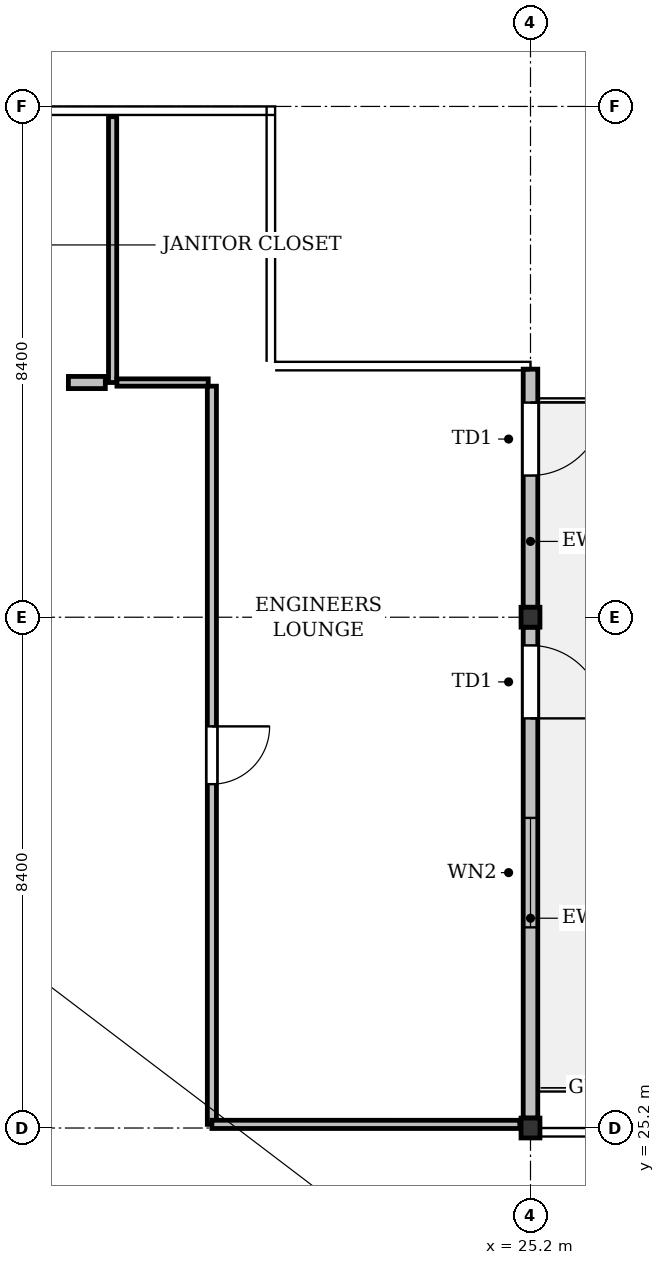
"""IFC4 building model, lengths in metres.
Left out: names, types, materials, properties, quantities, classifications, styles, units other than length and angle.
Written with IfcOpenShell. Run it as: python <this file> out.ifc"""

import sys

from ifc_helpers import new_model, si_unit, direction, frame, frame_2d, origin, origin_2d, place, context, subcontext, project, spatial, rectangle, i_section, extrude, element, fill, save


model = new_model("IFC4")
c1 = context("Model", 3, precision=1e-05, world=origin(), true_north=direction((0.0, 1.0)))
c2 = subcontext(c1, "Body", "Model", "MODEL_VIEW")
j1 = project(units=[si_unit("LENGTHUNIT", "METRE"), si_unit("PLANEANGLEUNIT", "RADIAN")], contexts=[c1])
p1 = place(None, origin())
s1 = spatial("IfcSite", under=j1, at=p1, CompositionType="ELEMENT")
p2 = place(p1, origin())
s2 = spatial("IfcBuilding", under=s1, at=p2, CompositionType="ELEMENT")
p3 = place(p2, frame((0.0, 0.0, 250.2)))
s3 = spatial("IfcBuildingStorey", under=s2, at=p3, CompositionType="ELEMENT", Elevation=250.2)
for number, where, z_axis, x_axis in (
    (1, (25.2, 25.2, 0.0), (0.0, 0.0, 1.0), (1.0, 0.0, 0.0)),
    (2, (25.2, 33.6, 0.0), (0.0, 0.0, 1.0), (1.0, 0.0, 0.0)),
):
    element("IfcColumn", number, at=place(p3, frame(where, z_axis=z_axis, x_axis=x_axis)), inside=s3, PredefinedType="COLUMN", context=c2, shape_type="SweptSolid", body=[
        extrude(i_section(OverallWidth=0.311, OverallDepth=0.327, WebThickness=0.016, FlangeThickness=0.025, FilletRadius=0.017, at=origin_2d()), origin(), (0.0, 0.0, 1.0), 4.0),
    ])
p4 = place(p3, frame((25.2, 37.68, 0.0), z_axis=(0.0, 0.0, 1.0), x_axis=(0.0, -1.0, 0.0)))
e3 = element("IfcWall", 3, at=p4, inside=s3, PredefinedType="STANDARD", context=c2, shape_type="SweptSolid", body=[
    extrude(rectangle(XDim=3.917, YDim=0.24, at=frame_2d((1.958, 0.0))), origin(), (0.0, 0.0, 1.0), 3.725),
])
p5 = place(p4, frame((0.55, 0.0, 0.0)))
e4 = element("IfcOpeningElement", 4, at=p5, cuts=e3, PredefinedType="OPENING", context=c2, shape_type="SweptSolid", body=[
    extrude(rectangle(XDim=1.2, YDim=2.2, at=frame_2d((0.6, 1.1))), frame((0.0, 0.13, 0.0), z_axis=(0.0, -1.0, 0.0), x_axis=(1.0, 0.0, 0.0)), (0.0, 0.0, 1.0), 0.26),
])
p6 = place(p3, frame((25.2, 33.437, 0.0), z_axis=(0.0, 0.0, 1.0), x_axis=(0.0, -1.0, 0.0)))
e5 = element("IfcWall", 5, at=p6, inside=s3, PredefinedType="STANDARD", context=c2, shape_type="SweptSolid", body=[
    extrude(rectangle(XDim=8.073, YDim=0.24, at=frame_2d((4.037, 0.0))), origin(), (0.0, 0.0, 1.0), 3.475),
])
p7 = place(p6, frame((0.3, 0.0, 0.0)))
e6 = element("IfcOpeningElement", 6, at=p7, cuts=e5, PredefinedType="OPENING", context=c2, shape_type="SweptSolid", body=[
    extrude(rectangle(XDim=1.2, YDim=2.2, at=frame_2d((0.6, 1.1))), frame((0.0, 0.13, 0.0), z_axis=(0.0, -1.0, 0.0), x_axis=(1.0, 0.0, 0.0)), (0.0, 0.0, 1.0), 0.26),
])
p8 = place(p6, frame((3.136, 0.0, 0.9)))
e7 = element("IfcOpeningElement", 7, at=p8, cuts=e5, PredefinedType="OPENING", context=c2, shape_type="SweptSolid", body=[
    extrude(rectangle(XDim=1.8, YDim=1.6, at=frame_2d((0.9, 0.8))), frame((0.0, 0.13, 0.0), z_axis=(0.0, -1.0, 0.0), x_axis=(1.0, 0.0, 0.0)), (0.0, 0.0, 1.0), 0.26),
])
p9 = place(p3, frame((18.327, 41.831, 0.0), z_axis=(0.0, 0.0, 1.0), x_axis=(0.0, -1.0, 0.0)))
e8 = element("IfcWall", 8, at=p9, inside=s3, PredefinedType="PARTITIONING", context=c2, shape_type="SweptSolid", body=[
    extrude(rectangle(XDim=4.371, YDim=0.135, at=frame_2d((2.186, 0.0))), origin(), (0.0, 0.0, 1.0), 3.725),
])
p10 = place(p3, frame((18.399, 37.46, 0.0), z_axis=(0.0, 0.0, 1.0), x_axis=(1.0, 0.0, 0.0)))
e9 = element("IfcWall", 9, at=p10, inside=s3, PredefinedType="PARTITIONING", context=c2, shape_type="SweptSolid", body=[
    extrude(rectangle(XDim=1.501, YDim=0.12, at=frame_2d((0.75, 0.0))), origin(), (0.0, 0.0, 1.0), 3.725),
])
p11 = place(p3, frame((19.96, 37.4, 0.0), z_axis=(0.0, 0.0, 1.0), x_axis=(0.0, -1.0, 0.0)))
e10 = element("IfcWall", 10, at=p11, inside=s3, PredefinedType="PARTITIONING", context=c2, shape_type="SweptSolid", body=[
    extrude(rectangle(XDim=12.14, YDim=0.15, at=frame_2d((6.07, 0.0))), origin(), (0.0, 0.0, 1.0), 3.271),
])
p12 = place(p11, frame((5.595, 0.0, 0.0)))
e11 = element("IfcOpeningElement", 11, at=p12, cuts=e10, PredefinedType="OPENING", context=c2, shape_type="SweptSolid", body=[
    extrude(rectangle(XDim=0.95, YDim=2.15, at=frame_2d((0.475, 1.075))), frame((0.0, 0.085, 0.0), z_axis=(0.0, -1.0, 0.0), x_axis=(1.0, 0.0, 0.0)), (0.0, 0.0, 1.0), 0.17),
])
p13 = place(p3, frame((19.96, 25.26, 0.0), z_axis=(0.0, 0.0, 1.0), x_axis=(0.999999995352, -9.641342e-05, 0.0)))
e12 = element("IfcWall", 12, at=p13, inside=s3, PredefinedType="PARTITIONING", context=c2, shape_type="SweptSolid", body=[
    extrude(rectangle(XDim=5.064, YDim=0.135, at=frame_2d((2.532, 0.0))), origin(), (0.0, 0.0, 1.0), 3.271),
])
p14 = place(p3, frame((17.6, 37.46, 0.0), z_axis=(0.0, 0.0, 1.0), x_axis=(1.0, 0.0, 0.0)))
e13 = element("IfcWall", 13, at=p14, inside=s3, PredefinedType="PARTITIONING", context=c2, shape_type="SweptSolid", body=[
    extrude(rectangle(XDim=0.607, YDim=0.2, at=frame_2d((0.304, 0.0))), origin(), (0.0, 0.0, 1.0), 3.725),
])
p15 = place(p5, origin())
e14 = element("IfcDoor", 14, at=p15, inside=s3, OperationType="SINGLE_SWING_LEFT", PredefinedType="DOOR", context=c2, shape_type="SweptSolid", body=[
    extrude(rectangle(XDim=1.2, YDim=2.2, at=frame_2d((0.6, 1.1))), frame((0.0, 0.025, 0.0), z_axis=(0.0, -1.0, 0.0), x_axis=(1.0, 0.0, 0.0)), (0.0, 0.0, 1.0), 0.05),
])
fill(e4, e14)
p16 = place(p7, origin())
e15 = element("IfcDoor", 15, at=p16, inside=s3, OperationType="SINGLE_SWING_RIGHT", PredefinedType="DOOR", context=c2, shape_type="SweptSolid", body=[
    extrude(rectangle(XDim=1.2, YDim=2.2, at=frame_2d((0.6, 1.1))), frame((0.0, 0.025, 0.0), z_axis=(0.0, -1.0, 0.0), x_axis=(1.0, 0.0, 0.0)), (0.0, 0.0, 1.0), 0.05),
])
fill(e6, e15)
p17 = place(p8, origin())
e16 = element("IfcWindow", 16, at=p17, inside=s3, PartitioningType="SINGLE_PANEL", PredefinedType="WINDOW", context=c2, shape_type="SweptSolid", body=[
    extrude(rectangle(XDim=1.8, YDim=1.6, at=frame_2d((0.9, 0.8))), frame((0.0, 0.03, 0.0), z_axis=(0.0, -1.0, 0.0), x_axis=(1.0, 0.0, 0.0)), (0.0, 0.0, 1.0), 0.06),
])
fill(e7, e16)
p18 = place(p12, origin())
e17 = element("IfcDoor", 17, at=p18, inside=s3, OperationType="SINGLE_SWING_LEFT", PredefinedType="DOOR", context=c2, shape_type="SweptSolid", body=[
    extrude(rectangle(XDim=0.95, YDim=2.15, at=frame_2d((0.475, 1.075))), frame((0.0, 0.025, 0.0), z_axis=(0.0, -1.0, 0.0), x_axis=(1.0, 0.0, 0.0)), (0.0, 0.0, 1.0), 0.05),
])
fill(e11, e17)
save(model, sys.argv[1])
